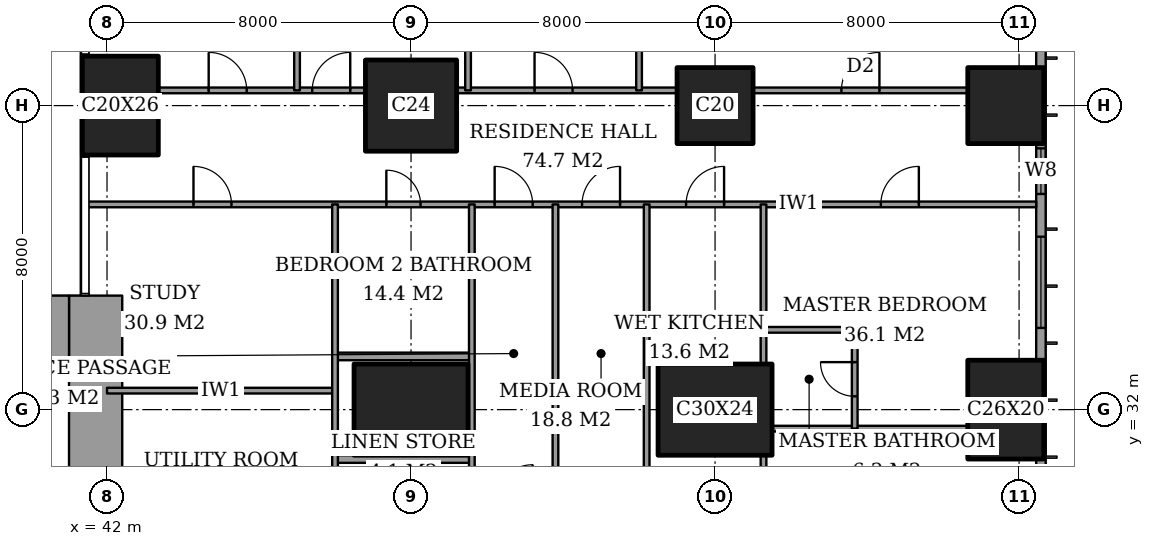
"""IFC4 building model, lengths in metres.
Left out: names, types, materials, properties, quantities, classifications, styles, units other than length and angle.
Written with IfcOpenShell. Run it as: python <this file> out.ifc"""

import sys

from ifc_helpers import new_model, si_unit, direction, frame, frame_2d, origin, origin_2d, place, context, subcontext, project, spatial, rectangle, extrude, element, fill, save


model = new_model("IFC4")
c1 = context("Model", 3, precision=1e-05, world=origin(), true_north=direction((0.0, 1.0)))
c2 = subcontext(c1, "Body", "Model", "MODEL_VIEW")
j1 = project(units=[si_unit("LENGTHUNIT", "METRE"), si_unit("PLANEANGLEUNIT", "RADIAN")], contexts=[c1])
p1 = place(None, origin())
s1 = spatial("IfcSite", under=j1, at=p1, CompositionType="ELEMENT")
p2 = place(p1, origin())
s2 = spatial("IfcBuilding", under=s1, at=p2, CompositionType="ELEMENT")
p3 = place(p2, frame((0.0, 0.0, 72.8)))
s3 = spatial("IfcBuildingStorey", under=s2, at=p3, CompositionType="ELEMENT", Elevation=72.8)
p4 = place(p3, frame((42.35, 40.0, 0.0), z_axis=(0.0, 0.0, 1.0), x_axis=(1.0, 0.0, 0.0)))
e1 = element("IfcColumn", 1, at=p4, inside=s3, PredefinedType="COLUMN", context=c2, shape_type="SweptSolid", body=[
    extrude(rectangle(XDim=2.0, YDim=2.6, at=origin_2d()), origin(), (0.0, 0.0, 1.0), 3.6),
])
p5 = place(p3, frame((50.0, 32.0, 0.0), z_axis=(0.0, 0.0, 1.0), x_axis=(1.0, 0.0, 0.0)))
e2 = element("IfcColumn", 2, at=p5, inside=s3, PredefinedType="COLUMN", context=c2, shape_type="SweptSolid", body=[
    extrude(rectangle(XDim=3.0, YDim=2.4, at=origin_2d()), origin(), (0.0, 0.0, 1.0), 3.6),
])
p6 = place(p3, frame((50.0, 40.0, 0.0), z_axis=(0.0, 0.0, 1.0), x_axis=(1.0, 0.0, 0.0)))
e3 = element("IfcColumn", 3, at=p6, inside=s3, PredefinedType="COLUMN", context=c2, shape_type="SweptSolid", body=[
    extrude(rectangle(XDim=2.4, YDim=2.4, at=origin_2d()), origin(), (0.0, 0.0, 1.0), 3.6),
])
p7 = place(p3, frame((58.0, 32.0, 0.0), z_axis=(0.0, 0.0, 1.0), x_axis=(1.0, 0.0, 0.0)))
e4 = element("IfcColumn", 4, at=p7, inside=s3, PredefinedType="COLUMN", context=c2, shape_type="SweptSolid", body=[
    extrude(rectangle(XDim=3.0, YDim=2.4, at=origin_2d()), origin(), (0.0, 0.0, 1.0), 3.6),
])
p8 = place(p3, frame((58.0, 40.0, 0.0), z_axis=(0.0, 0.0, 1.0), x_axis=(1.0, 0.0, 0.0)))
e5 = element("IfcColumn", 5, at=p8, inside=s3, PredefinedType="COLUMN", context=c2, shape_type="SweptSolid", body=[
    extrude(rectangle(XDim=2.0, YDim=2.0, at=origin_2d()), origin(), (0.0, 0.0, 1.0), 3.6),
])
p9 = place(p3, frame((65.65, 32.0, 0.0), z_axis=(0.0, 0.0, 1.0), x_axis=(0.0, 1.0, 0.0)))
e6 = element("IfcColumn", 6, at=p9, inside=s3, PredefinedType="COLUMN", context=c2, shape_type="SweptSolid", body=[
    extrude(rectangle(XDim=2.6, YDim=2.0, at=origin_2d()), origin(), (0.0, 0.0, 1.0), 3.6),
])
p10 = place(p3, frame((65.65, 40.0, 0.0), z_axis=(0.0, 0.0, 1.0), x_axis=(1.0, 0.0, 0.0)))
e7 = element("IfcColumn", 7, at=p10, inside=s3, PredefinedType="COLUMN", context=c2, shape_type="SweptSolid", body=[
    extrude(rectangle(XDim=2.0, YDim=2.0, at=origin_2d()), origin(), (0.0, 0.0, 1.0), 3.6),
])
p11 = place(p3, frame((37.85, 34.0, 0.0), z_axis=(0.0, 0.0, 1.0), x_axis=(1.0, 0.0, 0.0)))
e8 = element("IfcWall", 8, at=p11, inside=s3, PredefinedType="SHEAR", context=c2, shape_type="SweptSolid", body=[
    extrude(rectangle(XDim=3.15, YDim=2.0, at=frame_2d((1.575, 0.0))), origin(), (0.0, 0.0, 1.0), 3.6),
])
p12 = place(p3, frame((41.7, 24.85, 0.0), z_axis=(0.0, 0.0, 1.0), x_axis=(0.0, 1.0, 0.0)))
e9 = element("IfcWall", 9, at=p12, inside=s3, PredefinedType="SHEAR", context=c2, shape_type="SweptSolid", body=[
    extrude(rectangle(XDim=10.15, YDim=1.4, at=frame_2d((5.075, 0.0))), origin(), (0.0, 0.0, 1.0), 3.6),
])
p13 = place(p3, frame((66.575, 3.175, 0.0), z_axis=(0.0, 0.0, 1.0), x_axis=(0.0, 1.0, 0.0)))
e10 = element("IfcWall", 10, at=p13, inside=s3, PredefinedType="SOLIDWALL", context=c2, shape_type="SweptSolid", body=[
    extrude(rectangle(XDim=41.65, YDim=0.25, at=frame_2d((20.825, 0.0))), origin(), (0.0, 0.0, 1.0), 3.6),
])
p14 = place(p13, frame((0.775, 0.0, 0.6)))
e11 = element("IfcOpeningElement", 11, at=p14, cuts=e10, PredefinedType="OPENING", context=c2, shape_type="SweptSolid", body=[
    extrude(rectangle(XDim=2.4, YDim=2.0, at=frame_2d((1.2, 1.0))), frame((0.0, 0.135, 0.0), z_axis=(0.0, -1.0, 0.0), x_axis=(1.0, 0.0, 0.0)), (0.0, 0.0, 1.0), 0.27),
])
p15 = place(p13, frame((6.1, 0.0, 0.6)))
e12 = element("IfcOpeningElement", 12, at=p15, cuts=e10, PredefinedType="OPENING", context=c2, shape_type="SweptSolid", body=[
    extrude(rectangle(XDim=1.2, YDim=2.0, at=frame_2d((0.6, 1.0))), frame((0.0, 0.135, 0.0), z_axis=(0.0, -1.0, 0.0), x_axis=(1.0, 0.0, 0.0)), (0.0, 0.0, 1.0), 0.27),
])
p16 = place(p13, frame((8.275, 0.0, 0.6)))
e13 = element("IfcOpeningElement", 13, at=p16, cuts=e10, PredefinedType="OPENING", context=c2, shape_type="SweptSolid", body=[
    extrude(rectangle(XDim=2.4, YDim=2.0, at=frame_2d((1.2, 1.0))), frame((0.0, 0.135, 0.0), z_axis=(0.0, -1.0, 0.0), x_axis=(1.0, 0.0, 0.0)), (0.0, 0.0, 1.0), 0.27),
])
p17 = place(p13, frame((15.775, 0.0, 0.6)))
e14 = element("IfcOpeningElement", 14, at=p17, cuts=e10, PredefinedType="OPENING", context=c2, shape_type="SweptSolid", body=[
    extrude(rectangle(XDim=2.4, YDim=2.0, at=frame_2d((1.2, 1.0))), frame((0.0, 0.135, 0.0), z_axis=(0.0, -1.0, 0.0), x_axis=(1.0, 0.0, 0.0)), (0.0, 0.0, 1.0), 0.27),
])
p18 = place(p13, frame((23.475, 0.0, 0.6)))
e15 = element("IfcOpeningElement", 15, at=p18, cuts=e10, PredefinedType="OPENING", context=c2, shape_type="SweptSolid", body=[
    extrude(rectangle(XDim=2.4, YDim=2.0, at=frame_2d((1.2, 1.0))), frame((0.0, 0.135, 0.0), z_axis=(0.0, -1.0, 0.0), x_axis=(1.0, 0.0, 0.0)), (0.0, 0.0, 1.0), 0.27),
])
p19 = place(p13, frame((30.975, 0.0, 0.6)))
e16 = element("IfcOpeningElement", 16, at=p19, cuts=e10, PredefinedType="OPENING", context=c2, shape_type="SweptSolid", body=[
    extrude(rectangle(XDim=2.4, YDim=2.0, at=frame_2d((1.2, 1.0))), frame((0.0, 0.135, 0.0), z_axis=(0.0, -1.0, 0.0), x_axis=(1.0, 0.0, 0.0)), (0.0, 0.0, 1.0), 0.27),
])
p20 = place(p13, frame((34.5, 0.0, 0.6)))
e17 = element("IfcOpeningElement", 17, at=p20, cuts=e10, PredefinedType="OPENING", context=c2, shape_type="SweptSolid", body=[
    extrude(rectangle(XDim=1.2, YDim=2.0, at=frame_2d((0.6, 1.0))), frame((0.0, 0.135, 0.0), z_axis=(0.0, -1.0, 0.0), x_axis=(1.0, 0.0, 0.0)), (0.0, 0.0, 1.0), 0.27),
])
p21 = place(p13, frame((38.475, 0.0, 0.6)))
e18 = element("IfcOpeningElement", 18, at=p21, cuts=e10, PredefinedType="OPENING", context=c2, shape_type="SweptSolid", body=[
    extrude(rectangle(XDim=2.4, YDim=2.0, at=frame_2d((1.2, 1.0))), frame((0.0, 0.135, 0.0), z_axis=(0.0, -1.0, 0.0), x_axis=(1.0, 0.0, 0.0)), (0.0, 0.0, 1.0), 0.27),
])
p22 = place(p3, frame((48.0, 30.7, 0.0), z_axis=(0.0, 0.0, 1.0), x_axis=(1.0, 0.0, 0.0)))
e19 = element("IfcWall", 19, at=p22, inside=s3, PredefinedType="PARTITIONING", context=c2, shape_type="SweptSolid", body=[
    extrude(rectangle(XDim=3.6, YDim=0.2, at=frame_2d((1.8, 0.0))), origin(), (0.0, 0.0, 1.0), 3.35),
])
p23 = place(p3, frame((59.5, 31.5, 0.0), z_axis=(0.0, 0.0, 1.0), x_axis=(1.0, 0.0, 0.0)))
e20 = element("IfcWall", 20, at=p23, inside=s3, PredefinedType="PARTITIONING", context=c2, shape_type="SweptSolid", body=[
    extrude(rectangle(XDim=5.15, YDim=0.15, at=frame_2d((2.575, 0.0))), origin(), (0.0, 0.0, 1.0), 3.35),
])
p24 = place(p3, frame((42.0, 32.5, 0.0), z_axis=(0.0, 0.0, 1.0), x_axis=(1.0, 0.0, 0.0)))
e21 = element("IfcWall", 21, at=p24, inside=s3, PredefinedType="PARTITIONING", context=c2, shape_type="SweptSolid", body=[
    extrude(rectangle(XDim=6.0, YDim=0.15, at=frame_2d((3.0, 0.0))), origin(), (0.0, 0.0, 1.0), 3.35),
])
p25 = place(p3, frame((48.0, 33.4, 0.0), z_axis=(0.0, 0.0, 1.0), x_axis=(1.0, 0.0, 0.0)))
e22 = element("IfcWall", 22, at=p25, inside=s3, PredefinedType="PARTITIONING", context=c2, shape_type="SweptSolid", body=[
    extrude(rectangle(XDim=3.6, YDim=0.2, at=frame_2d((1.8, 0.0))), origin(), (0.0, 0.0, 1.0), 3.35),
])
p26 = place(p3, frame((59.275, 34.1, 0.0), z_axis=(0.0, 0.0, 1.0), x_axis=(1.0, 0.0, 0.0)))
e23 = element("IfcWall", 23, at=p26, inside=s3, PredefinedType="PARTITIONING", context=c2, shape_type="SweptSolid", body=[
    extrude(rectangle(XDim=2.4, YDim=0.15, at=frame_2d((1.2, 0.0))), origin(), (0.0, 0.0, 1.0), 3.35),
])
p27 = place(p3, frame((41.439, 37.4, 0.0), z_axis=(0.0, 0.0, 1.0), x_axis=(1.0, 0.0, 0.0)))
e24 = element("IfcWall", 24, at=p27, inside=s3, PredefinedType="PARTITIONING", context=c2, shape_type="SweptSolid", body=[
    extrude(rectangle(XDim=25.011, YDim=0.15, at=frame_2d((12.505, 0.0))), origin(), (0.0, 0.0, 1.0), 3.35),
])
p28 = place(p27, frame((10.761, 0.0, 0.0)))
e25 = element("IfcOpeningElement", 25, at=p28, cuts=e24, PredefinedType="OPENING", context=c2, shape_type="SweptSolid", body=[
    extrude(rectangle(XDim=1.0, YDim=2.1, at=frame_2d((0.5, 1.05))), frame((0.0, 0.085, 0.0), z_axis=(0.0, -1.0, 0.0), x_axis=(1.0, 0.0, 0.0)), (0.0, 0.0, 1.0), 0.17),
])
p29 = place(p27, frame((20.924, 0.0, 0.0)))
e26 = element("IfcOpeningElement", 26, at=p29, cuts=e24, PredefinedType="OPENING", context=c2, shape_type="SweptSolid", body=[
    extrude(rectangle(XDim=1.0, YDim=2.1, at=frame_2d((0.5, 1.05))), frame((0.0, 0.085, 0.0), z_axis=(0.0, -1.0, 0.0), x_axis=(1.0, 0.0, 0.0)), (0.0, 0.0, 1.0), 0.17),
])
p30 = place(p27, frame((15.799, 0.0, 0.0)))
e27 = element("IfcOpeningElement", 27, at=p30, cuts=e24, PredefinedType="OPENING", context=c2, shape_type="SweptSolid", body=[
    extrude(rectangle(XDim=1.0, YDim=2.1, at=frame_2d((0.5, 1.05))), frame((0.0, 0.085, 0.0), z_axis=(0.0, -1.0, 0.0), x_axis=(1.0, 0.0, 0.0)), (0.0, 0.0, 1.0), 0.17),
])
p31 = place(p27, frame((13.061, 0.0, 0.0)))
e28 = element("IfcOpeningElement", 28, at=p31, cuts=e24, PredefinedType="OPENING", context=c2, shape_type="SweptSolid", body=[
    extrude(rectangle(XDim=1.0, YDim=2.1, at=frame_2d((0.5, 1.05))), frame((0.0, 0.085, 0.0), z_axis=(0.0, -1.0, 0.0), x_axis=(1.0, 0.0, 0.0)), (0.0, 0.0, 1.0), 0.17),
])
p32 = place(p27, frame((7.911, 0.0, 0.0)))
e29 = element("IfcOpeningElement", 29, at=p32, cuts=e24, PredefinedType="OPENING", context=c2, shape_type="SweptSolid", body=[
    extrude(rectangle(XDim=0.9, YDim=2.1, at=frame_2d((0.45, 1.05))), frame((0.0, 0.085, 0.0), z_axis=(0.0, -1.0, 0.0), x_axis=(1.0, 0.0, 0.0)), (0.0, 0.0, 1.0), 0.17),
])
p33 = place(p27, frame((2.836, 0.0, 0.0)))
e30 = element("IfcOpeningElement", 30, at=p33, cuts=e24, PredefinedType="OPENING", context=c2, shape_type="SweptSolid", body=[
    extrude(rectangle(XDim=1.0, YDim=2.1, at=frame_2d((0.5, 1.05))), frame((0.0, 0.085, 0.0), z_axis=(0.0, -1.0, 0.0), x_axis=(1.0, 0.0, 0.0)), (0.0, 0.0, 1.0), 0.17),
])
p34 = place(p3, frame((43.35, 40.4, 0.0), z_axis=(0.0, 0.0, 1.0), x_axis=(1.0, 0.0, 0.0)))
e31 = element("IfcWall", 31, at=p34, inside=s3, PredefinedType="PARTITIONING", context=c2, shape_type="SweptSolid", body=[
    extrude(rectangle(XDim=5.45, YDim=0.15, at=frame_2d((2.725, 0.0))), origin(), (0.0, 0.0, 1.0), 3.35),
])
p35 = place(p34, frame((4.05, 0.0, 0.0)))
e32 = element("IfcOpeningElement", 32, at=p35, cuts=e31, PredefinedType="OPENING", context=c2, shape_type="SweptSolid", body=[
    extrude(rectangle(XDim=1.0, YDim=2.1, at=frame_2d((0.5, 1.05))), frame((0.0, 0.085, 0.0), z_axis=(0.0, -1.0, 0.0), x_axis=(1.0, 0.0, 0.0)), (0.0, 0.0, 1.0), 0.17),
])
p36 = place(p34, frame((1.325, 0.0, 0.0)))
e33 = element("IfcOpeningElement", 33, at=p36, cuts=e31, PredefinedType="OPENING", context=c2, shape_type="SweptSolid", body=[
    extrude(rectangle(XDim=1.0, YDim=2.1, at=frame_2d((0.5, 1.05))), frame((0.0, 0.085, 0.0), z_axis=(0.0, -1.0, 0.0), x_axis=(1.0, 0.0, 0.0)), (0.0, 0.0, 1.0), 0.17),
])
p37 = place(p3, frame((51.2, 40.4, 0.0), z_axis=(0.0, 0.0, 1.0), x_axis=(1.0, 0.0, 0.0)))
e34 = element("IfcWall", 34, at=p37, inside=s3, PredefinedType="PARTITIONING", context=c2, shape_type="SweptSolid", body=[
    extrude(rectangle(XDim=5.8, YDim=0.15, at=frame_2d((2.9, 0.0))), origin(), (0.0, 0.0, 1.0), 3.35),
])
p38 = place(p37, frame((2.05, 0.0, 0.0)))
e35 = element("IfcOpeningElement", 35, at=p38, cuts=e34, PredefinedType="OPENING", context=c2, shape_type="SweptSolid", body=[
    extrude(rectangle(XDim=1.0, YDim=2.1, at=frame_2d((0.5, 1.05))), frame((0.0, 0.085, 0.0), z_axis=(0.0, -1.0, 0.0), x_axis=(1.0, 0.0, 0.0)), (0.0, 0.0, 1.0), 0.17),
])
p39 = place(p3, frame((59.0, 40.4, 0.0), z_axis=(0.0, 0.0, 1.0), x_axis=(1.0, 0.0, 0.0)))
e36 = element("IfcWall", 36, at=p39, inside=s3, PredefinedType="PARTITIONING", context=c2, shape_type="SweptSolid", body=[
    extrude(rectangle(XDim=5.65, YDim=0.15, at=frame_2d((2.825, 0.0))), origin(), (0.0, 0.0, 1.0), 3.35),
])
p40 = place(p39, frame((2.325, 0.0, 0.0)))
e37 = element("IfcOpeningElement", 37, at=p40, cuts=e36, PredefinedType="OPENING", context=c2, shape_type="SweptSolid", body=[
    extrude(rectangle(XDim=1.0, YDim=2.1, at=frame_2d((0.5, 1.05))), frame((0.0, 0.085, 0.0), z_axis=(0.0, -1.0, 0.0), x_axis=(1.0, 0.0, 0.0)), (0.0, 0.0, 1.0), 0.17),
])
p41 = place(p3, frame((47.0, 40.4, 0.0), z_axis=(0.0, 0.0, 1.0), x_axis=(0.0, 1.0, 0.0)))
e38 = element("IfcWall", 38, at=p41, inside=s3, PredefinedType="PARTITIONING", context=c2, shape_type="SweptSolid", body=[
    extrude(rectangle(XDim=8.05, YDim=0.15, at=frame_2d((4.025, 0.0))), origin(), (0.0, 0.0, 1.0), 3.35),
])
p42 = place(p3, frame((48.0, 28.0, 0.0), z_axis=(0.0, 0.0, 1.0), x_axis=(0.0, 1.0, 0.0)))
e39 = element("IfcWall", 39, at=p42, inside=s3, PredefinedType="PARTITIONING", context=c2, shape_type="SweptSolid", body=[
    extrude(rectangle(XDim=9.4, YDim=0.15, at=frame_2d((4.7, 0.0))), origin(), (0.0, 0.0, 1.0), 3.35),
])
p43 = place(p42, frame((0.325, 0.0, 0.0)))
e40 = element("IfcOpeningElement", 40, at=p43, cuts=e39, PredefinedType="OPENING", context=c2, shape_type="SweptSolid", body=[
    extrude(rectangle(XDim=0.9, YDim=2.1, at=frame_2d((0.45, 1.05))), frame((0.0, 0.085, 0.0), z_axis=(0.0, -1.0, 0.0), x_axis=(1.0, 0.0, 0.0)), (0.0, 0.0, 1.0), 0.17),
])
p44 = place(p3, frame((51.5, 40.4, 0.0), z_axis=(0.0, 0.0, 1.0), x_axis=(0.0, 1.0, 0.0)))
e41 = element("IfcWall", 41, at=p44, inside=s3, PredefinedType="PARTITIONING", context=c2, shape_type="SweptSolid", body=[
    extrude(rectangle(XDim=8.05, YDim=0.15, at=frame_2d((4.025, 0.0))), origin(), (0.0, 0.0, 1.0), 3.35),
])
for number, where, z_axis, x_axis in (
    (42, (51.6, 29.55, 0.0), (0.0, 0.0, 1.0), (0.0, 1.0, 0.0)),
    (43, (53.8, 29.55, 0.0), (0.0, 0.0, 1.0), (0.0, 1.0, 0.0)),
):
    element("IfcWall", number, at=place(p3, frame(where, z_axis=z_axis, x_axis=x_axis)), inside=s3, PredefinedType="PARTITIONING", context=c2, shape_type="SweptSolid", body=[
        extrude(rectangle(XDim=7.85, YDim=0.15, at=frame_2d((3.925, 0.0))), origin(), (0.0, 0.0, 1.0), 3.35),
    ])
p45 = place(p3, frame((56.0, 40.4, 0.0), z_axis=(0.0, 0.0, 1.0), x_axis=(0.0, 1.0, 0.0)))
e44 = element("IfcWall", 44, at=p45, inside=s3, PredefinedType="PARTITIONING", context=c2, shape_type="SweptSolid", body=[
    extrude(rectangle(XDim=8.05, YDim=0.15, at=frame_2d((4.025, 0.0))), origin(), (0.0, 0.0, 1.0), 3.35),
])
p46 = place(p3, frame((56.2, 28.0, 0.0), z_axis=(0.0, 0.0, 1.0), x_axis=(0.0, 1.0, 0.0)))
e45 = element("IfcWall", 45, at=p46, inside=s3, PredefinedType="PARTITIONING", context=c2, shape_type="SweptSolid", body=[
    extrude(rectangle(XDim=9.4, YDim=0.15, at=frame_2d((4.7, 0.0))), origin(), (0.0, 0.0, 1.0), 3.35),
])
p47 = place(p46, frame((0.325, 0.0, 0.0)))
e46 = element("IfcOpeningElement", 46, at=p47, cuts=e45, PredefinedType="OPENING", context=c2, shape_type="SweptSolid", body=[
    extrude(rectangle(XDim=0.9, YDim=2.1, at=frame_2d((0.45, 1.05))), frame((0.0, 0.085, 0.0), z_axis=(0.0, -1.0, 0.0), x_axis=(1.0, 0.0, 0.0)), (0.0, 0.0, 1.0), 0.17),
])
p48 = place(p3, frame((59.275, 28.35, 0.0), z_axis=(0.0, 0.0, 1.0), x_axis=(0.0, 1.0, 0.0)))
e47 = element("IfcWall", 47, at=p48, inside=s3, PredefinedType="PARTITIONING", context=c2, shape_type="SweptSolid", body=[
    extrude(rectangle(XDim=2.45, YDim=0.15, at=frame_2d((1.225, 0.0))), origin(), (0.0, 0.0, 1.0), 3.35),
])
p49 = place(p48, frame((0.913, 0.0, 0.0)))
e48 = element("IfcOpeningElement", 48, at=p49, cuts=e47, PredefinedType="OPENING", context=c2, shape_type="SweptSolid", body=[
    extrude(rectangle(XDim=1.0, YDim=2.1, at=frame_2d((0.5, 1.05))), frame((0.0, 0.085, 0.0), z_axis=(0.0, -1.0, 0.0), x_axis=(1.0, 0.0, 0.0)), (0.0, 0.0, 1.0), 0.17),
])
p50 = place(p3, frame((59.275, 33.2, 0.0), z_axis=(0.0, 0.0, 1.0), x_axis=(0.0, 1.0, 0.0)))
e49 = element("IfcWall", 49, at=p50, inside=s3, PredefinedType="PARTITIONING", context=c2, shape_type="SweptSolid", body=[
    extrude(rectangle(XDim=4.2, YDim=0.15, at=frame_2d((2.1, 0.0))), origin(), (0.0, 0.0, 1.0), 3.35),
])
p51 = place(p3, frame((61.675, 31.5, 0.0), z_axis=(0.0, 0.0, 1.0), x_axis=(0.0, 1.0, 0.0)))
e50 = element("IfcWall", 50, at=p51, inside=s3, PredefinedType="PARTITIONING", context=c2, shape_type="SweptSolid", body=[
    extrude(rectangle(XDim=2.6, YDim=0.15, at=frame_2d((1.3, 0.0))), origin(), (0.0, 0.0, 1.0), 3.35),
])
p52 = place(p51, frame((0.85, 0.0, 0.0)))
e51 = element("IfcOpeningElement", 51, at=p52, cuts=e50, PredefinedType="OPENING", context=c2, shape_type="SweptSolid", body=[
    extrude(rectangle(XDim=0.9, YDim=2.1, at=frame_2d((0.45, 1.05))), frame((0.0, 0.085, 0.0), z_axis=(0.0, -1.0, 0.0), x_axis=(1.0, 0.0, 0.0)), (0.0, 0.0, 1.0), 0.17),
])
p53 = place(p19, origin())
e52 = element("IfcWindow", 52, at=p53, inside=s3, PartitioningType="SINGLE_PANEL", PredefinedType="WINDOW", context=c2, shape_type="SweptSolid", body=[
    extrude(rectangle(XDim=2.4, YDim=2.0, at=frame_2d((1.2, 1.0))), frame((0.0, 0.03, 0.0), z_axis=(0.0, -1.0, 0.0), x_axis=(1.0, 0.0, 0.0)), (0.0, 0.0, 1.0), 0.06),
])
fill(e16, e52)
p54 = place(p20, origin())
e53 = element("IfcWindow", 53, at=p54, inside=s3, PartitioningType="SINGLE_PANEL", PredefinedType="WINDOW", context=c2, shape_type="SweptSolid", body=[
    extrude(rectangle(XDim=1.2, YDim=2.0, at=frame_2d((0.6, 1.0))), frame((0.0, 0.03, 0.0), z_axis=(0.0, -1.0, 0.0), x_axis=(1.0, 0.0, 0.0)), (0.0, 0.0, 1.0), 0.06),
])
fill(e17, e53)
p55 = place(p40, origin())
e54 = element("IfcDoor", 54, at=p55, inside=s3, OperationType="SINGLE_SWING_LEFT", PredefinedType="DOOR", context=c2, shape_type="SweptSolid", body=[
    extrude(rectangle(XDim=1.0, YDim=2.1, at=frame_2d((0.5, 1.05))), frame((0.0, 0.025, 0.0), z_axis=(0.0, -1.0, 0.0), x_axis=(1.0, 0.0, 0.0)), (0.0, 0.0, 1.0), 0.05),
])
fill(e37, e54)
p56 = place(p38, origin())
e55 = element("IfcDoor", 55, at=p56, inside=s3, OperationType="SINGLE_SWING_RIGHT", PredefinedType="DOOR", context=c2, shape_type="SweptSolid", body=[
    extrude(rectangle(XDim=1.0, YDim=2.1, at=frame_2d((0.5, 1.05))), frame((0.0, 0.025, 0.0), z_axis=(0.0, -1.0, 0.0), x_axis=(1.0, 0.0, 0.0)), (0.0, 0.0, 1.0), 0.05),
])
fill(e35, e55)
p57 = place(p35, origin())
e56 = element("IfcDoor", 56, at=p57, inside=s3, OperationType="SINGLE_SWING_LEFT", PredefinedType="DOOR", context=c2, shape_type="SweptSolid", body=[
    extrude(rectangle(XDim=1.0, YDim=2.1, at=frame_2d((0.5, 1.05))), frame((0.0, 0.025, 0.0), z_axis=(0.0, -1.0, 0.0), x_axis=(1.0, 0.0, 0.0)), (0.0, 0.0, 1.0), 0.05),
])
fill(e32, e56)
p58 = place(p36, origin())
e57 = element("IfcDoor", 57, at=p58, inside=s3, OperationType="SINGLE_SWING_RIGHT", PredefinedType="DOOR", context=c2, shape_type="SweptSolid", body=[
    extrude(rectangle(XDim=1.0, YDim=2.1, at=frame_2d((0.5, 1.05))), frame((0.0, 0.025, 0.0), z_axis=(0.0, -1.0, 0.0), x_axis=(1.0, 0.0, 0.0)), (0.0, 0.0, 1.0), 0.05),
])
fill(e33, e57)
p59 = place(p28, origin())
e58 = element("IfcDoor", 58, at=p59, inside=s3, OperationType="SINGLE_SWING_RIGHT", PredefinedType="DOOR", context=c2, shape_type="SweptSolid", body=[
    extrude(rectangle(XDim=1.0, YDim=2.1, at=frame_2d((0.5, 1.05))), frame((0.0, 0.025, 0.0), z_axis=(0.0, -1.0, 0.0), x_axis=(1.0, 0.0, 0.0)), (0.0, 0.0, 1.0), 0.05),
])
fill(e25, e58)
p60 = place(p52, origin())
e59 = element("IfcDoor", 59, at=p60, inside=s3, OperationType="SINGLE_SWING_LEFT", PredefinedType="DOOR", context=c2, shape_type="SweptSolid", body=[
    extrude(rectangle(XDim=0.9, YDim=2.1, at=frame_2d((0.45, 1.05))), frame((0.0, 0.025, 0.0), z_axis=(0.0, -1.0, 0.0), x_axis=(1.0, 0.0, 0.0)), (0.0, 0.0, 1.0), 0.05),
])
fill(e51, e59)
p61 = place(p29, origin())
e60 = element("IfcDoor", 60, at=p61, inside=s3, OperationType="SINGLE_SWING_LEFT", PredefinedType="DOOR", context=c2, shape_type="SweptSolid", body=[
    extrude(rectangle(XDim=1.0, YDim=2.1, at=frame_2d((0.5, 1.05))), frame((0.0, 0.025, 0.0), z_axis=(0.0, -1.0, 0.0), x_axis=(1.0, 0.0, 0.0)), (0.0, 0.0, 1.0), 0.05),
])
fill(e26, e60)
p62 = place(p30, origin())
e61 = element("IfcDoor", 61, at=p62, inside=s3, OperationType="SINGLE_SWING_LEFT", PredefinedType="DOOR", context=c2, shape_type="SweptSolid", body=[
    extrude(rectangle(XDim=1.0, YDim=2.1, at=frame_2d((0.5, 1.05))), frame((0.0, 0.025, 0.0), z_axis=(0.0, -1.0, 0.0), x_axis=(1.0, 0.0, 0.0)), (0.0, 0.0, 1.0), 0.05),
])
fill(e27, e61)
p63 = place(p31, origin())
e62 = element("IfcDoor", 62, at=p63, inside=s3, OperationType="SINGLE_SWING_LEFT", PredefinedType="DOOR", context=c2, shape_type="SweptSolid", body=[
    extrude(rectangle(XDim=1.0, YDim=2.1, at=frame_2d((0.5, 1.05))), frame((0.0, 0.025, 0.0), z_axis=(0.0, -1.0, 0.0), x_axis=(1.0, 0.0, 0.0)), (0.0, 0.0, 1.0), 0.05),
])
fill(e28, e62)
p64 = place(p32, origin())
e63 = element("IfcDoor", 63, at=p64, inside=s3, OperationType="SINGLE_SWING_RIGHT", PredefinedType="DOOR", context=c2, shape_type="SweptSolid", body=[
    extrude(rectangle(XDim=0.9, YDim=2.1, at=frame_2d((0.45, 1.05))), frame((0.0, 0.025, 0.0), z_axis=(0.0, -1.0, 0.0), x_axis=(1.0, 0.0, 0.0)), (0.0, 0.0, 1.0), 0.05),
])
fill(e29, e63)
p65 = place(p33, origin())
e64 = element("IfcDoor", 64, at=p65, inside=s3, OperationType="SINGLE_SWING_RIGHT", PredefinedType="DOOR", context=c2, shape_type="SweptSolid", body=[
    extrude(rectangle(XDim=1.0, YDim=2.1, at=frame_2d((0.5, 1.05))), frame((0.0, 0.025, 0.0), z_axis=(0.0, -1.0, 0.0), x_axis=(1.0, 0.0, 0.0)), (0.0, 0.0, 1.0), 0.05),
])
fill(e30, e64)
save(model, sys.argv[1])
